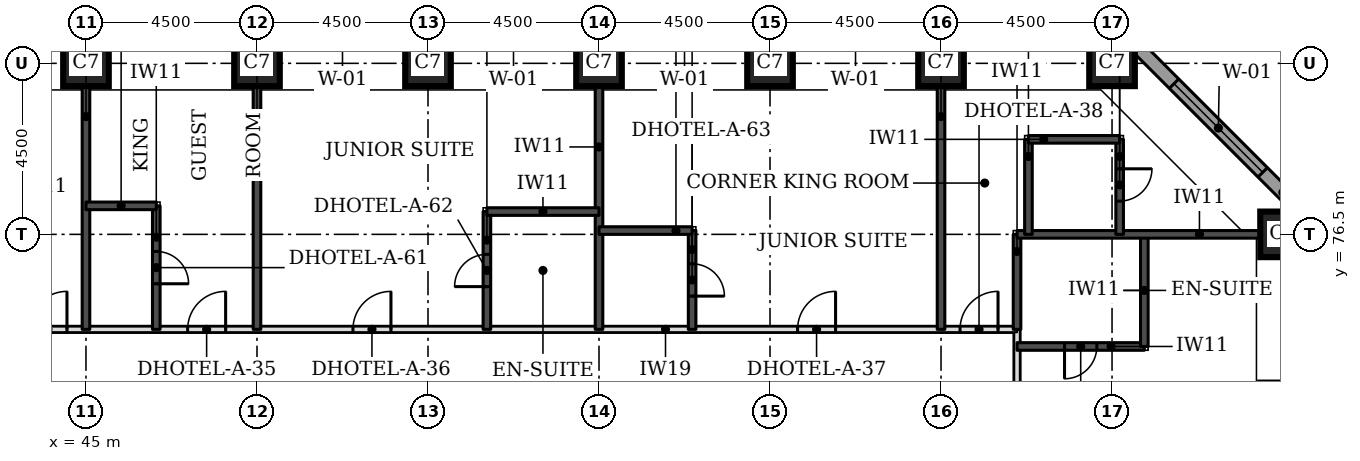
"""IFC4 building model, lengths in metres.
Left out: names, types, materials, properties, quantities, classifications, styles, units other than length and angle.
Written with IfcOpenShell. Run it as: python <this file> out.ifc"""

import sys

from ifc_helpers import new_model, si_unit, direction, frame, frame_2d, origin, origin_2d, place, context, subcontext, project, spatial, rectangle, extrude, element, fill, save


model = new_model("IFC4")
c1 = context("Model", 3, precision=1e-05, world=origin(), true_north=direction((0.0, 1.0)))
c2 = subcontext(c1, "Body", "Model", "MODEL_VIEW")
j1 = project(units=[si_unit("LENGTHUNIT", "METRE"), si_unit("PLANEANGLEUNIT", "RADIAN")], contexts=[c1])
p1 = place(None, origin())
s1 = spatial("IfcSite", under=j1, at=p1, CompositionType="ELEMENT")
p2 = place(p1, origin())
s2 = spatial("IfcBuilding", under=s1, at=p2, CompositionType="ELEMENT")
p3 = place(p2, frame((0.0, 0.0, 26.4)))
s3 = spatial("IfcBuildingStorey", under=s2, at=p3, CompositionType="ELEMENT", Elevation=26.4)
for number, where, z_axis, x_axis in (
    (1, (76.5, 76.5, 0.0), (0.0, 0.0, 1.0), (1.0, 0.0, 0.0)),
    (2, (45.0, 81.0, 0.0), (0.0, 0.0, 1.0), (1.0, 0.0, 0.0)),
    (3, (49.5, 81.0, 0.0), (0.0, 0.0, 1.0), (1.0, 0.0, 0.0)),
    (4, (54.0, 81.0, 0.0), (0.0, 0.0, 1.0), (1.0, 0.0, 0.0)),
    (5, (58.5, 81.0, 0.0), (0.0, 0.0, 1.0), (1.0, 0.0, 0.0)),
    (6, (63.0, 81.0, 0.0), (0.0, 0.0, 1.0), (1.0, 0.0, 0.0)),
    (7, (67.5, 81.0, 0.0), (0.0, 0.0, 1.0), (1.0, 0.0, 0.0)),
    (8, (72.0, 81.0, 0.0), (0.0, 0.0, 1.0), (1.0, 0.0, 0.0)),
):
    element("IfcColumn", number, at=place(p3, frame(where, z_axis=z_axis, x_axis=x_axis)), inside=s3, PredefinedType="COLUMN", context=c2, shape_type="SweptSolid", body=[
        extrude(rectangle(XDim=1.2, YDim=1.2, at=origin_2d()), origin(), (0.0, 0.0, 1.0), 3.3),
    ])
p4 = place(p3, frame((77.326, 76.77, 0.0), z_axis=(0.0, 0.0, 1.0), x_axis=(-0.707106781187, 0.707106781187, 0.0)))
e9 = element("IfcWall", 9, at=p4, inside=s3, PredefinedType="STANDARD", context=c2, shape_type="SweptSolid", body=[
    extrude(rectangle(XDim=7.151, YDim=0.35, at=frame_2d((3.576, 0.0))), origin(), (0.0, 0.0, 1.0), 3.055),
])
p5 = place(p4, frame((1.926, 0.0, 0.8)))
e10 = element("IfcOpeningElement", 10, at=p5, cuts=e9, PredefinedType="OPENING", context=c2, shape_type="SweptSolid", body=[
    extrude(rectangle(XDim=3.3, YDim=1.5, at=frame_2d((1.65, 0.75))), frame((0.0, 0.185, 0.0), z_axis=(0.0, -1.0, 0.0), x_axis=(1.0, 0.0, 0.0)), (0.0, 0.0, 1.0), 0.37),
])
p6 = place(p3, frame((69.5, 47.5, 0.0), z_axis=(0.0, 0.0, 1.0), x_axis=(0.0, 1.0, 0.0)))
e11 = element("IfcWall", 11, at=p6, inside=s3, PredefinedType="PARTITIONING", context=c2, shape_type="SweptSolid", body=[
    extrude(rectangle(XDim=26.5, YDim=0.15, at=frame_2d((13.25, 0.0))), origin(), (0.0, 0.0, 1.0), 3.08),
])
p7 = place(p6, frame((22.525, 0.0, 0.0)))
e12 = element("IfcOpeningElement", 12, at=p7, cuts=e11, PredefinedType="OPENING", context=c2, shape_type="SweptSolid", body=[
    extrude(rectangle(XDim=1.0, YDim=2.1, at=frame_2d((0.5, 1.05))), frame((0.0, 0.085, 0.0), z_axis=(0.0, -1.0, 0.0), x_axis=(1.0, 0.0, 0.0)), (0.0, 0.0, 1.0), 0.17),
])
p8 = place(p6, frame((16.225, 0.0, 0.0)))
e13 = element("IfcOpeningElement", 13, at=p8, cuts=e11, PredefinedType="OPENING", context=c2, shape_type="SweptSolid", body=[
    extrude(rectangle(XDim=1.0, YDim=2.1, at=frame_2d((0.5, 1.05))), frame((0.0, 0.085, 0.0), z_axis=(0.0, -1.0, 0.0), x_axis=(1.0, 0.0, 0.0)), (0.0, 0.0, 1.0), 0.17),
])
p9 = place(p6, frame((4.25, 0.0, 0.0)))
e14 = element("IfcOpeningElement", 14, at=p9, cuts=e11, PredefinedType="OPENING", context=c2, shape_type="SweptSolid", body=[
    extrude(rectangle(XDim=1.1, YDim=2.1, at=frame_2d((0.55, 1.05))), frame((0.0, 0.085, 0.0), z_axis=(0.0, -1.0, 0.0), x_axis=(1.0, 0.0, 0.0)), (0.0, 0.0, 1.0), 0.17),
])
p10 = place(p6, frame((0.447, 0.0, 0.0)))
e15 = element("IfcOpeningElement", 15, at=p10, cuts=e11, PredefinedType="OPENING", context=c2, shape_type="SweptSolid", body=[
    extrude(rectangle(XDim=1.0, YDim=2.1, at=frame_2d((0.5, 1.05))), frame((0.0, 0.085, 0.0), z_axis=(0.0, -1.0, 0.0), x_axis=(1.0, 0.0, 0.0)), (0.0, 0.0, 1.0), 0.17),
])
p11 = place(p3, frame((43.0, 74.0, 0.0), z_axis=(0.0, 0.0, 1.0), x_axis=(1.0, 0.0, 0.0)))
e16 = element("IfcWall", 16, at=p11, inside=s3, PredefinedType="PARTITIONING", context=c2, shape_type="SweptSolid", body=[
    extrude(rectangle(XDim=26.5, YDim=0.15, at=frame_2d((13.25, 0.0))), origin(), (0.0, 0.0, 1.0), 3.08),
])
p12 = place(p11, frame((4.675, 0.0, 0.0)))
e17 = element("IfcOpeningElement", 17, at=p12, cuts=e16, PredefinedType="OPENING", context=c2, shape_type="SweptSolid", body=[
    extrude(rectangle(XDim=1.0, YDim=2.1, at=frame_2d((0.5, 1.05))), frame((0.0, 0.085, 0.0), z_axis=(0.0, -1.0, 0.0), x_axis=(1.0, 0.0, 0.0)), (0.0, 0.0, 1.0), 0.17),
])
p13 = place(p11, frame((9.025, 0.0, 0.0)))
e18 = element("IfcOpeningElement", 18, at=p13, cuts=e16, PredefinedType="OPENING", context=c2, shape_type="SweptSolid", body=[
    extrude(rectangle(XDim=1.0, YDim=2.1, at=frame_2d((0.5, 1.05))), frame((0.0, 0.085, 0.0), z_axis=(0.0, -1.0, 0.0), x_axis=(1.0, 0.0, 0.0)), (0.0, 0.0, 1.0), 0.17),
])
p14 = place(p11, frame((20.725, 0.0, 0.0)))
e19 = element("IfcOpeningElement", 19, at=p14, cuts=e16, PredefinedType="OPENING", context=c2, shape_type="SweptSolid", body=[
    extrude(rectangle(XDim=1.0, YDim=2.1, at=frame_2d((0.5, 1.05))), frame((0.0, 0.085, 0.0), z_axis=(0.0, -1.0, 0.0), x_axis=(1.0, 0.0, 0.0)), (0.0, 0.0, 1.0), 0.17),
])
p15 = place(p11, frame((0.5, 0.0, 0.0)))
e20 = element("IfcOpeningElement", 20, at=p15, cuts=e16, PredefinedType="OPENING", context=c2, shape_type="SweptSolid", body=[
    extrude(rectangle(XDim=1.0, YDim=2.1, at=frame_2d((0.5, 1.05))), frame((0.0, 0.085, 0.0), z_axis=(0.0, -1.0, 0.0), x_axis=(1.0, 0.0, 0.0)), (0.0, 0.0, 1.0), 0.17),
])
p16 = place(p11, frame((25.0, 0.0, 0.0)))
e21 = element("IfcOpeningElement", 21, at=p16, cuts=e16, PredefinedType="OPENING", context=c2, shape_type="SweptSolid", body=[
    extrude(rectangle(XDim=1.0, YDim=2.1, at=frame_2d((0.5, 1.05))), frame((0.0, 0.085, 0.0), z_axis=(0.0, -1.0, 0.0), x_axis=(1.0, 0.0, 0.0)), (0.0, 0.0, 1.0), 0.17),
])
p17 = place(p3, frame((69.5, 73.55, 0.0), z_axis=(0.0, 0.0, 1.0), x_axis=(1.0, 0.0, 0.0)))
e22 = element("IfcWall", 22, at=p17, inside=s3, PredefinedType="SOLIDWALL", context=c2, shape_type="SweptSolid", body=[
    extrude(rectangle(XDim=3.35, YDim=0.2, at=frame_2d((1.675, 0.0))), origin(), (0.0, 0.0, 1.0), 3.08),
])
p18 = place(p17, frame((1.25, 0.0, 0.0)))
e23 = element("IfcOpeningElement", 23, at=p18, cuts=e22, PredefinedType="OPENING", context=c2, shape_type="SweptSolid", body=[
    extrude(rectangle(XDim=0.85, YDim=2.1, at=frame_2d((0.425, 1.05))), frame((0.0, 0.11, 0.0), z_axis=(0.0, -1.0, 0.0), x_axis=(1.0, 0.0, 0.0)), (0.0, 0.0, 1.0), 0.22),
])
p19 = place(p3, frame((72.85, 73.55, 0.0), z_axis=(0.0, 0.0, 1.0), x_axis=(0.0, 1.0, 0.0)))
e24 = element("IfcWall", 24, at=p19, inside=s3, PredefinedType="SOLIDWALL", context=c2, shape_type="SweptSolid", body=[
    extrude(rectangle(XDim=2.95, YDim=0.2, at=frame_2d((1.475, 0.0))), origin(), (0.0, 0.0, 1.0), 3.08),
])
p20 = place(p3, frame((45.0, 74.0, 0.0), z_axis=(0.0, 0.0, 1.0), x_axis=(0.0, 1.0, 0.0)))
e25 = element("IfcWall", 25, at=p20, inside=s3, PredefinedType="SOLIDWALL", context=c2, shape_type="SweptSolid", body=[
    extrude(rectangle(XDim=6.4, YDim=0.2, at=frame_2d((3.2, 0.0))), origin(), (0.0, 0.0, 1.0), 3.08),
])
p21 = place(p3, frame((46.85, 74.0, 0.0), z_axis=(0.0, 0.0, 1.0), x_axis=(0.0, 1.0, 0.0)))
e26 = element("IfcWall", 26, at=p21, inside=s3, PredefinedType="SOLIDWALL", context=c2, shape_type="SweptSolid", body=[
    extrude(rectangle(XDim=3.25, YDim=0.2, at=frame_2d((1.625, 0.0))), origin(), (0.0, 0.0, 1.0), 3.08),
])
p22 = place(p21, frame((1.2, 0.0, 0.0)))
e27 = element("IfcOpeningElement", 27, at=p22, cuts=e26, PredefinedType="OPENING", context=c2, shape_type="SweptSolid", body=[
    extrude(rectangle(XDim=0.85, YDim=2.1, at=frame_2d((0.425, 1.05))), frame((0.0, 0.11, 0.0), z_axis=(0.0, -1.0, 0.0), x_axis=(1.0, 0.0, 0.0)), (0.0, 0.0, 1.0), 0.22),
])
p23 = place(p3, frame((49.5, 74.0, 0.0), z_axis=(0.0, 0.0, 1.0), x_axis=(0.0, 1.0, 0.0)))
e28 = element("IfcWall", 28, at=p23, inside=s3, PredefinedType="SOLIDWALL", context=c2, shape_type="SweptSolid", body=[
    extrude(rectangle(XDim=6.4, YDim=0.2, at=frame_2d((3.2, 0.0))), origin(), (0.0, 0.0, 1.0), 3.08),
])
p24 = place(p3, frame((55.55, 74.0, 0.0), z_axis=(0.0, 0.0, 1.0), x_axis=(0.0, 1.0, 0.0)))
e29 = element("IfcWall", 29, at=p24, inside=s3, PredefinedType="SOLIDWALL", context=c2, shape_type="SweptSolid", body=[
    extrude(rectangle(XDim=3.1, YDim=0.2, at=frame_2d((1.55, 0.0))), origin(), (0.0, 0.0, 1.0), 3.08),
])
p25 = place(p24, frame((1.125, 0.0, 0.0)))
e30 = element("IfcOpeningElement", 30, at=p25, cuts=e29, PredefinedType="OPENING", context=c2, shape_type="SweptSolid", body=[
    extrude(rectangle(XDim=0.85, YDim=2.1, at=frame_2d((0.425, 1.05))), frame((0.0, 0.11, 0.0), z_axis=(0.0, -1.0, 0.0), x_axis=(1.0, 0.0, 0.0)), (0.0, 0.0, 1.0), 0.22),
])
p26 = place(p3, frame((58.5, 74.0, 0.0), z_axis=(0.0, 0.0, 1.0), x_axis=(0.0, 1.0, 0.0)))
e31 = element("IfcWall", 31, at=p26, inside=s3, PredefinedType="SOLIDWALL", context=c2, shape_type="SweptSolid", body=[
    extrude(rectangle(XDim=6.4, YDim=0.2, at=frame_2d((3.2, 0.0))), origin(), (0.0, 0.0, 1.0), 3.08),
])
p27 = place(p3, frame((60.95, 74.0, 0.0), z_axis=(0.0, 0.0, 1.0), x_axis=(0.0, 1.0, 0.0)))
e32 = element("IfcWall", 32, at=p27, inside=s3, PredefinedType="SOLIDWALL", context=c2, shape_type="SweptSolid", body=[
    extrude(rectangle(XDim=2.6, YDim=0.2, at=frame_2d((1.3, 0.0))), origin(), (0.0, 0.0, 1.0), 3.08),
])
p28 = place(p27, frame((0.875, 0.0, 0.0)))
e33 = element("IfcOpeningElement", 33, at=p28, cuts=e32, PredefinedType="OPENING", context=c2, shape_type="SweptSolid", body=[
    extrude(rectangle(XDim=0.85, YDim=2.1, at=frame_2d((0.425, 1.05))), frame((0.0, 0.11, 0.0), z_axis=(0.0, -1.0, 0.0), x_axis=(1.0, 0.0, 0.0)), (0.0, 0.0, 1.0), 0.22),
])
p29 = place(p3, frame((67.5, 74.0, 0.0), z_axis=(0.0, 0.0, 1.0), x_axis=(0.0, 1.0, 0.0)))
e34 = element("IfcWall", 34, at=p29, inside=s3, PredefinedType="SOLIDWALL", context=c2, shape_type="SweptSolid", body=[
    extrude(rectangle(XDim=6.4, YDim=0.2, at=frame_2d((3.2, 0.0))), origin(), (0.0, 0.0, 1.0), 3.08),
])
p30 = place(p3, frame((69.5, 74.0, 0.0), z_axis=(0.0, 0.0, 1.0), x_axis=(0.0, 1.0, 0.0)))
e35 = element("IfcWall", 35, at=p30, inside=s3, PredefinedType="SOLIDWALL", context=c2, shape_type="SweptSolid", body=[
    extrude(rectangle(XDim=2.5, YDim=0.2, at=frame_2d((1.25, 0.0))), origin(), (0.0, 0.0, 1.0), 3.08),
])
p31 = place(p3, frame((69.5, 76.5, 0.0), z_axis=(0.0, 0.0, 1.0), x_axis=(1.0, 0.0, 0.0)))
e36 = element("IfcWall", 36, at=p31, inside=s3, PredefinedType="SOLIDWALL", context=c2, shape_type="SweptSolid", body=[
    extrude(rectangle(XDim=6.4, YDim=0.2, at=frame_2d((3.2, 0.0))), origin(), (0.0, 0.0, 1.0), 3.08),
])
p32 = place(p3, frame((69.8, 76.5, 0.0), z_axis=(0.0, 0.0, 1.0), x_axis=(0.0, 1.0, 0.0)))
e37 = element("IfcWall", 37, at=p32, inside=s3, PredefinedType="SOLIDWALL", context=c2, shape_type="SweptSolid", body=[
    extrude(rectangle(XDim=2.5, YDim=0.2, at=frame_2d((1.25, 0.0))), origin(), (0.0, 0.0, 1.0), 3.08),
])
p33 = place(p3, frame((72.2, 76.5, 0.0), z_axis=(0.0, 0.0, 1.0), x_axis=(0.0, 1.0, 0.0)))
e38 = element("IfcWall", 38, at=p33, inside=s3, PredefinedType="SOLIDWALL", context=c2, shape_type="SweptSolid", body=[
    extrude(rectangle(XDim=2.5, YDim=0.2, at=frame_2d((1.25, 0.0))), origin(), (0.0, 0.0, 1.0), 3.08),
])
p34 = place(p33, frame((0.875, 0.0, 0.0)))
e39 = element("IfcOpeningElement", 39, at=p34, cuts=e38, PredefinedType="OPENING", context=c2, shape_type="SweptSolid", body=[
    extrude(rectangle(XDim=0.85, YDim=2.1, at=frame_2d((0.425, 1.05))), frame((0.0, 0.11, 0.0), z_axis=(0.0, -1.0, 0.0), x_axis=(1.0, 0.0, 0.0)), (0.0, 0.0, 1.0), 0.22),
])
p35 = place(p3, frame((58.5, 76.6, 0.0), z_axis=(0.0, 0.0, 1.0), x_axis=(1.0, 0.0, 0.0)))
e40 = element("IfcWall", 40, at=p35, inside=s3, PredefinedType="SOLIDWALL", context=c2, shape_type="SweptSolid", body=[
    extrude(rectangle(XDim=2.45, YDim=0.2, at=frame_2d((1.225, 0.0))), origin(), (0.0, 0.0, 1.0), 3.08),
])
p36 = place(p3, frame((55.55, 77.1, 0.0), z_axis=(0.0, 0.0, 1.0), x_axis=(1.0, 0.0, 0.0)))
e41 = element("IfcWall", 41, at=p36, inside=s3, PredefinedType="SOLIDWALL", context=c2, shape_type="SweptSolid", body=[
    extrude(rectangle(XDim=2.95, YDim=0.2, at=frame_2d((1.475, 0.0))), origin(), (0.0, 0.0, 1.0), 3.08),
])
p37 = place(p3, frame((45.0, 77.25, 0.0), z_axis=(0.0, 0.0, 1.0), x_axis=(1.0, 0.0, 0.0)))
e42 = element("IfcWall", 42, at=p37, inside=s3, PredefinedType="SOLIDWALL", context=c2, shape_type="SweptSolid", body=[
    extrude(rectangle(XDim=1.85, YDim=0.2, at=frame_2d((0.925, 0.0))), origin(), (0.0, 0.0, 1.0), 3.08),
])
p38 = place(p3, frame((69.8, 79.0, 0.0), z_axis=(0.0, 0.0, 1.0), x_axis=(1.0, 0.0, 0.0)))
e43 = element("IfcWall", 43, at=p38, inside=s3, PredefinedType="SOLIDWALL", context=c2, shape_type="SweptSolid", body=[
    extrude(rectangle(XDim=2.4, YDim=0.2, at=frame_2d((1.2, 0.0))), origin(), (0.0, 0.0, 1.0), 3.08),
])
p39 = place(p5, origin())
e44 = element("IfcWindow", 44, at=p39, inside=s3, PartitioningType="SINGLE_PANEL", PredefinedType="WINDOW", context=c2, shape_type="SweptSolid", body=[
    extrude(rectangle(XDim=3.3, YDim=1.5, at=frame_2d((1.65, 0.75))), frame((0.0, 0.085, 0.0), z_axis=(0.0, -1.0, 0.0), x_axis=(1.0, 0.0, 0.0)), (0.0, 0.0, 1.0), 0.06),
])
fill(e10, e44)
p40 = place(p12, origin())
e45 = element("IfcDoor", 45, at=p40, inside=s3, OperationType="SINGLE_SWING_RIGHT", PredefinedType="DOOR", context=c2, shape_type="SweptSolid", body=[
    extrude(rectangle(XDim=1.0, YDim=2.1, at=frame_2d((0.5, 1.05))), frame((0.0, 0.025, 0.0), z_axis=(0.0, -1.0, 0.0), x_axis=(1.0, 0.0, 0.0)), (0.0, 0.0, 1.0), 0.05),
])
fill(e17, e45)
p41 = place(p22, frame((0.85, 0.0, 0.0), z_axis=(0.0, 0.0, 1.0), x_axis=(-1.0, 0.0, 0.0)))
e46 = element("IfcDoor", 46, at=p41, inside=s3, OperationType="SINGLE_SWING_RIGHT", PredefinedType="DOOR", context=c2, shape_type="SweptSolid", body=[
    extrude(rectangle(XDim=0.85, YDim=2.1, at=frame_2d((0.425, 1.05))), frame((0.0, 0.025, 0.0), z_axis=(0.0, -1.0, 0.0), x_axis=(1.0, 0.0, 0.0)), (0.0, 0.0, 1.0), 0.05),
])
fill(e27, e46)
p42 = place(p13, origin())
e47 = element("IfcDoor", 47, at=p42, inside=s3, OperationType="SINGLE_SWING_RIGHT", PredefinedType="DOOR", context=c2, shape_type="SweptSolid", body=[
    extrude(rectangle(XDim=1.0, YDim=2.1, at=frame_2d((0.5, 1.05))), frame((0.0, 0.025, 0.0), z_axis=(0.0, -1.0, 0.0), x_axis=(1.0, 0.0, 0.0)), (0.0, 0.0, 1.0), 0.05),
])
fill(e18, e47)
p43 = place(p25, origin())
e48 = element("IfcDoor", 48, at=p43, inside=s3, OperationType="SINGLE_SWING_LEFT", PredefinedType="DOOR", context=c2, shape_type="SweptSolid", body=[
    extrude(rectangle(XDim=0.85, YDim=2.1, at=frame_2d((0.425, 1.05))), frame((0.0, 0.025, 0.0), z_axis=(0.0, -1.0, 0.0), x_axis=(1.0, 0.0, 0.0)), (0.0, 0.0, 1.0), 0.05),
])
fill(e30, e48)
p44 = place(p14, origin())
e49 = element("IfcDoor", 49, at=p44, inside=s3, OperationType="SINGLE_SWING_RIGHT", PredefinedType="DOOR", context=c2, shape_type="SweptSolid", body=[
    extrude(rectangle(XDim=1.0, YDim=2.1, at=frame_2d((0.5, 1.05))), frame((0.0, 0.025, 0.0), z_axis=(0.0, -1.0, 0.0), x_axis=(1.0, 0.0, 0.0)), (0.0, 0.0, 1.0), 0.05),
])
fill(e19, e49)
p45 = place(p28, frame((0.85, 0.0, 0.0), z_axis=(0.0, 0.0, 1.0), x_axis=(-1.0, 0.0, 0.0)))
e50 = element("IfcDoor", 50, at=p45, inside=s3, OperationType="SINGLE_SWING_RIGHT", PredefinedType="DOOR", context=c2, shape_type="SweptSolid", body=[
    extrude(rectangle(XDim=0.85, YDim=2.1, at=frame_2d((0.425, 1.05))), frame((0.0, 0.025, 0.0), z_axis=(0.0, -1.0, 0.0), x_axis=(1.0, 0.0, 0.0)), (0.0, 0.0, 1.0), 0.05),
])
fill(e33, e50)
p46 = place(p18, frame((0.85, 0.0, 0.0), z_axis=(0.0, 0.0, 1.0), x_axis=(-1.0, 0.0, 0.0)))
e51 = element("IfcDoor", 51, at=p46, inside=s3, OperationType="SINGLE_SWING_RIGHT", PredefinedType="DOOR", context=c2, shape_type="SweptSolid", body=[
    extrude(rectangle(XDim=0.85, YDim=2.1, at=frame_2d((0.425, 1.05))), frame((0.0, 0.025, 0.0), z_axis=(0.0, -1.0, 0.0), x_axis=(1.0, 0.0, 0.0)), (0.0, 0.0, 1.0), 0.05),
])
fill(e23, e51)
p47 = place(p15, origin())
e52 = element("IfcDoor", 52, at=p47, inside=s3, OperationType="SINGLE_SWING_RIGHT", PredefinedType="DOOR", context=c2, shape_type="SweptSolid", body=[
    extrude(rectangle(XDim=1.0, YDim=2.1, at=frame_2d((0.5, 1.05))), frame((0.0, 0.025, 0.0), z_axis=(0.0, -1.0, 0.0), x_axis=(1.0, 0.0, 0.0)), (0.0, 0.0, 1.0), 0.05),
])
fill(e20, e52)
p48 = place(p16, origin())
e53 = element("IfcDoor", 53, at=p48, inside=s3, OperationType="SINGLE_SWING_RIGHT", PredefinedType="DOOR", context=c2, shape_type="SweptSolid", body=[
    extrude(rectangle(XDim=1.0, YDim=2.1, at=frame_2d((0.5, 1.05))), frame((0.0, 0.025, 0.0), z_axis=(0.0, -1.0, 0.0), x_axis=(1.0, 0.0, 0.0)), (0.0, 0.0, 1.0), 0.05),
])
fill(e21, e53)
p49 = place(p34, frame((0.85, 0.0, 0.0), z_axis=(0.0, 0.0, 1.0), x_axis=(-1.0, 0.0, 0.0)))
e54 = element("IfcDoor", 54, at=p49, inside=s3, OperationType="SINGLE_SWING_LEFT", PredefinedType="DOOR", context=c2, shape_type="SweptSolid", body=[
    extrude(rectangle(XDim=0.85, YDim=2.1, at=frame_2d((0.425, 1.05))), frame((0.0, 0.025, 0.0), z_axis=(0.0, -1.0, 0.0), x_axis=(1.0, 0.0, 0.0)), (0.0, 0.0, 1.0), 0.05),
])
fill(e39, e54)
save(model, sys.argv[1])
